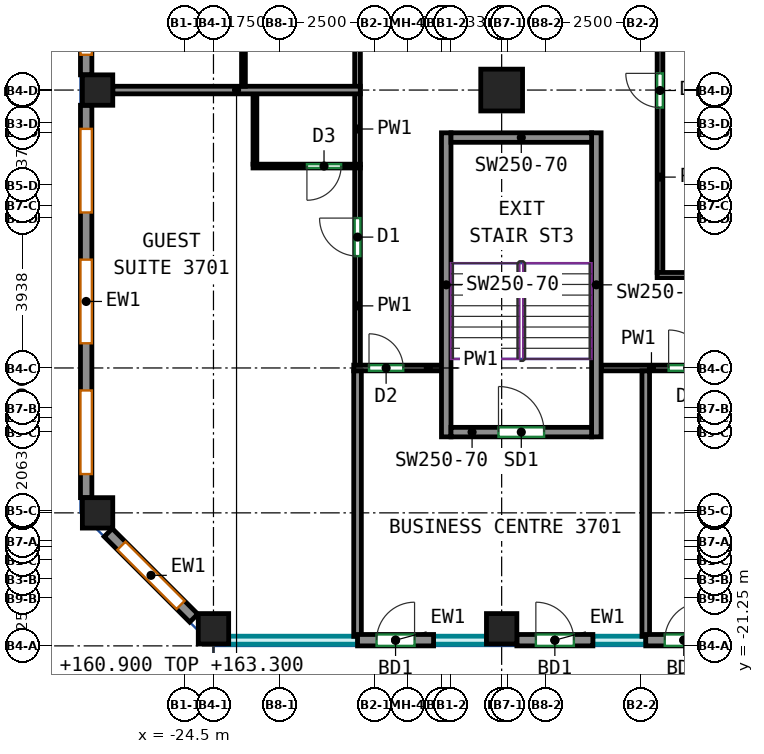
"""IFC4 building model, lengths in metres.
Left out: names, types, materials, properties, quantities, classifications, styles, units other than length and angle.
Written with IfcOpenShell. Run it as: python <this file> out.ifc"""

import sys

from ifc_helpers import new_model, si_unit, direction, frame, frame_2d, origin, origin_2d, place, context, subcontext, project, spatial, rectangle, extrude, source, transform, mapped, element, fill, save


model = new_model("IFC4")
c1 = context("Model", 3, precision=1e-05, world=origin(), true_north=direction((0.0, 1.0)))
c2 = subcontext(c1, "Body", "Model", "MODEL_VIEW")
j1 = project(units=[si_unit("LENGTHUNIT", "METRE"), si_unit("PLANEANGLEUNIT", "RADIAN")], contexts=[c1])
p1 = place(None, origin())
s1 = spatial("IfcSite", under=j1, at=p1, CompositionType="ELEMENT")
p2 = place(p1, origin())
s2 = spatial("IfcBuilding", under=s1, at=p2, CompositionType="ELEMENT")
p3 = place(p2, frame((0.0, 0.0, 160.9)))
s3 = spatial("IfcBuildingStorey", under=s2, at=p3, CompositionType="ELEMENT", Elevation=160.9)
m1 = source(origin(), c2, "Body", "SweptSolid", [
    extrude(rectangle(XDim=0.8, YDim=0.8, at=origin_2d()), origin(), (0.0, 0.0, 1.0), 3.0),
])
for number, where, z_axis, x_axis in (
    (1, (-26.8, -17.75, 0.0), (0.0, 0.0, 1.0), (1.0, 0.0, 0.0)),
    (2, (-26.8, -6.625, 0.0), (0.0, 0.0, 1.0), (1.0, 0.0, 0.0)),
    (3, (-23.75, -20.8, 0.0), (0.0, 0.0, 1.0), (1.0, 0.0, 0.0)),
    (4, (-16.167, -20.8, 0.0), (0.0, 0.0, 1.0), (1.0, 0.0, 0.0)),
):
    element("IfcColumn", number, at=place(p3, frame(where, z_axis=z_axis, x_axis=x_axis)), inside=s3, PredefinedType="COLUMN", context=c2, shape_type="MappedRepresentation", body=[
        mapped(m1, transform((0.0, 0.0, 0.0))),
    ])
m2 = source(origin(), c2, "Body", "SweptSolid", [
    extrude(rectangle(XDim=1.1, YDim=1.1, at=origin_2d()), origin(), (0.0, 0.0, 1.0), 3.0),
])
p4 = place(p3, frame((-16.167, -6.625, 0.0), z_axis=(0.0, 0.0, 1.0), x_axis=(1.0, 0.0, 0.0)))
e5 = element("IfcColumn", 5, at=p4, inside=s3, PredefinedType="COLUMN", context=c2, shape_type="MappedRepresentation", body=[
    mapped(m2, transform((0.0, 0.0, 0.0))),
])
m3 = source(origin(), c2, "Body", "SweptSolid", [
    extrude(rectangle(XDim=8.0, YDim=0.25, at=frame_2d((4.0, 0.0))), origin(), (0.0, 0.0, 1.0), 3.0),
])
for number, where, z_axis, x_axis in (
    (6, (-17.625, -15.75, 0.0), (0.0, 0.0, 1.0), (0.0, 1.0, 0.0)),
    (7, (-13.675, -15.75, 0.0), (0.0, 0.0, 1.0), (0.0, 1.0, 0.0)),
):
    element("IfcWall", number, at=place(p3, frame(where, z_axis=z_axis, x_axis=x_axis)), inside=s3, PredefinedType="SHEAR", context=c2, shape_type="MappedRepresentation", body=[
        mapped(m3, transform((0.0, 0.0, 0.0))),
    ])
m4 = source(origin(), c2, "Body", "SweptSolid", [
    extrude(rectangle(XDim=3.7, YDim=0.25, at=frame_2d((1.85, 0.0))), origin(), (0.0, 0.0, 1.0), 3.0),
])
p5 = place(p3, frame((-17.5, -15.625, 0.0), z_axis=(0.0, 0.0, 1.0), x_axis=(1.0, 0.0, 0.0)))
e8 = element("IfcWall", 8, at=p5, inside=s3, PredefinedType="SHEAR", context=c2, shape_type="MappedRepresentation", body=[
    mapped(m4, transform((0.0, 0.0, 0.0))),
])
p6 = place(p5, frame((1.25, 0.0, 0.0)))
e9 = element("IfcOpeningElement", 9, at=p6, cuts=e8, PredefinedType="OPENING", context=c2, shape_type="SweptSolid", body=[
    extrude(rectangle(XDim=1.2, YDim=2.1, at=frame_2d((0.6, 1.05))), frame((0.0, 0.135, 0.0), z_axis=(0.0, -1.0, 0.0), x_axis=(1.0, 0.0, 0.0)), (0.0, 0.0, 1.0), 0.27),
])
p7 = place(p3, frame((-17.5, -7.875, 0.0), z_axis=(0.0, 0.0, 1.0), x_axis=(1.0, 0.0, 0.0)))
e10 = element("IfcWall", 10, at=p7, inside=s3, PredefinedType="SHEAR", context=c2, shape_type="MappedRepresentation", body=[
    mapped(m4, transform((0.0, 0.0, 0.0))),
])
m5 = source(origin(), c2, "Body", "SweptSolid", [
    extrude(rectangle(XDim=2.0, YDim=0.3, at=frame_2d((1.0, 0.0))), origin(), (0.0, 0.0, 1.0), 3.0),
])
p8 = place(p3, frame((-19.958, -21.1, 0.0), z_axis=(0.0, 0.0, 1.0), x_axis=(1.0, 0.0, 0.0)))
e11 = element("IfcWall", 11, at=p8, inside=s3, PredefinedType="SOLIDWALL", context=c2, shape_type="MappedRepresentation", body=[
    mapped(m5, transform((0.0, 0.0, 0.0))),
])
p9 = place(p8, frame((0.5, 0.0, 0.0)))
e12 = element("IfcOpeningElement", 12, at=p9, cuts=e11, PredefinedType="OPENING", context=c2, shape_type="SweptSolid", body=[
    extrude(rectangle(XDim=1.0, YDim=2.1, at=frame_2d((0.5, 1.05))), frame((0.0, 0.16, 0.0), z_axis=(0.0, -1.0, 0.0), x_axis=(1.0, 0.0, 0.0)), (0.0, 0.0, 1.0), 0.32),
])
p10 = place(p3, frame((-15.767, -21.1, 0.0), z_axis=(0.0, 0.0, 1.0), x_axis=(1.0, 0.0, 0.0)))
e13 = element("IfcWall", 13, at=p10, inside=s3, PredefinedType="SOLIDWALL", context=c2, shape_type="MappedRepresentation", body=[
    mapped(m5, transform((0.0, 0.0, 0.0))),
])
p11 = place(p10, frame((0.5, 0.0, 0.0)))
e14 = element("IfcOpeningElement", 14, at=p11, cuts=e13, PredefinedType="OPENING", context=c2, shape_type="SweptSolid", body=[
    extrude(rectangle(XDim=1.0, YDim=2.1, at=frame_2d((0.5, 1.05))), frame((0.0, 0.16, 0.0), z_axis=(0.0, -1.0, 0.0), x_axis=(1.0, 0.0, 0.0)), (0.0, 0.0, 1.0), 0.32),
])
p12 = place(p3, frame((-12.375, -21.1, 0.0), z_axis=(0.0, 0.0, 1.0), x_axis=(1.0, 0.0, 0.0)))
e15 = element("IfcWall", 15, at=p12, inside=s3, PredefinedType="SOLIDWALL", context=c2, shape_type="MappedRepresentation", body=[
    mapped(m5, transform((0.0, 0.0, 0.0))),
])
p13 = place(p12, frame((0.5, 0.0, 0.0)))
e16 = element("IfcOpeningElement", 16, at=p13, cuts=e15, PredefinedType="OPENING", context=c2, shape_type="SweptSolid", body=[
    extrude(rectangle(XDim=1.0, YDim=2.1, at=frame_2d((0.5, 1.05))), frame((0.0, 0.16, 0.0), z_axis=(0.0, -1.0, 0.0), x_axis=(1.0, 0.0, 0.0)), (0.0, 0.0, 1.0), 0.32),
])
m6 = source(origin(), c2, "Body", "SweptSolid", [
    extrude(rectangle(XDim=6.513, YDim=0.3, at=frame_2d((3.256, 0.0))), origin(), (0.0, 0.0, 1.0), 3.0),
])
p14 = place(p3, frame((-27.1, 0.288, 0.0), z_axis=(0.0, 0.0, 1.0), x_axis=(0.0, -1.0, 0.0)))
e17 = element("IfcWall", 17, at=p14, inside=s3, PredefinedType="SOLIDWALL", context=c2, shape_type="MappedRepresentation", body=[
    mapped(m6, transform((0.0, 0.0, 0.0))),
])
p15 = place(p14, frame((0.528, 0.0, 0.85)))
e18 = element("IfcOpeningElement", 18, at=p15, cuts=e17, PredefinedType="OPENING", context=c2, shape_type="SweptSolid", body=[
    extrude(rectangle(XDim=2.2, YDim=1.95, at=frame_2d((1.1, 0.975))), frame((0.0, 0.16, 0.0), z_axis=(0.0, -1.0, 0.0), x_axis=(1.0, 0.0, 0.0)), (0.0, 0.0, 1.0), 0.32),
])
p16 = place(p14, frame((3.784, 0.0, 0.85)))
e19 = element("IfcOpeningElement", 19, at=p16, cuts=e17, PredefinedType="OPENING", context=c2, shape_type="SweptSolid", body=[
    extrude(rectangle(XDim=2.2, YDim=1.95, at=frame_2d((1.1, 0.975))), frame((0.0, 0.16, 0.0), z_axis=(0.0, -1.0, 0.0), x_axis=(1.0, 0.0, 0.0)), (0.0, 0.0, 1.0), 0.32),
])
m7 = source(origin(), c2, "Body", "SweptSolid", [
    extrude(rectangle(XDim=10.325, YDim=0.3, at=frame_2d((5.163, 0.0))), origin(), (0.0, 0.0, 1.0), 3.0),
])
p17 = place(p3, frame((-27.1, -7.025, 0.0), z_axis=(0.0, 0.0, 1.0), x_axis=(0.0, -1.0, 0.0)))
e20 = element("IfcWall", 20, at=p17, inside=s3, PredefinedType="SOLIDWALL", context=c2, shape_type="MappedRepresentation", body=[
    mapped(m7, transform((0.0, 0.0, 0.0))),
])
p18 = place(p17, frame((0.621, 0.0, 0.85)))
e21 = element("IfcOpeningElement", 21, at=p18, cuts=e20, PredefinedType="OPENING", context=c2, shape_type="SweptSolid", body=[
    extrude(rectangle(XDim=2.2, YDim=1.95, at=frame_2d((1.1, 0.975))), frame((0.0, 0.16, 0.0), z_axis=(0.0, -1.0, 0.0), x_axis=(1.0, 0.0, 0.0)), (0.0, 0.0, 1.0), 0.32),
])
p19 = place(p17, frame((4.062, 0.0, 0.85)))
e22 = element("IfcOpeningElement", 22, at=p19, cuts=e20, PredefinedType="OPENING", context=c2, shape_type="SweptSolid", body=[
    extrude(rectangle(XDim=2.2, YDim=1.95, at=frame_2d((1.1, 0.975))), frame((0.0, 0.16, 0.0), z_axis=(0.0, -1.0, 0.0), x_axis=(1.0, 0.0, 0.0)), (0.0, 0.0, 1.0), 0.32),
])
p20 = place(p17, frame((7.504, 0.0, 0.85)))
e23 = element("IfcOpeningElement", 23, at=p20, cuts=e20, PredefinedType="OPENING", context=c2, shape_type="SweptSolid", body=[
    extrude(rectangle(XDim=2.2, YDim=1.95, at=frame_2d((1.1, 0.975))), frame((0.0, 0.16, 0.0), z_axis=(0.0, -1.0, 0.0), x_axis=(1.0, 0.0, 0.0)), (0.0, 0.0, 1.0), 0.32),
])
m8 = source(origin(), c2, "Body", "SweptSolid", [
    extrude(rectangle(XDim=3.182, YDim=0.3, at=frame_2d((1.591, 0.0))), origin(), (0.0, 0.0, 1.0), 3.0),
])
p21 = place(p3, frame((-26.519, -18.269, 0.0), z_axis=(0.0, 0.0, 1.0), x_axis=(0.707068419229, -0.707145141063, 0.0)))
e24 = element("IfcWall", 24, at=p21, inside=s3, PredefinedType="SOLIDWALL", context=c2, shape_type="MappedRepresentation", body=[
    mapped(m8, transform((0.0, 0.0, 0.0))),
])
p22 = place(p21, frame((0.491, 0.0, 0.85)))
e25 = element("IfcOpeningElement", 25, at=p22, cuts=e24, PredefinedType="OPENING", context=c2, shape_type="SweptSolid", body=[
    extrude(rectangle(XDim=2.2, YDim=1.95, at=frame_2d((1.1, 0.975))), frame((0.0, 0.16, 0.0), z_axis=(0.0, -1.0, 0.0), x_axis=(1.0, 0.0, 0.0)), (0.0, 0.0, 1.0), 0.32),
])
p23 = place(p3, frame((-13.55, -13.938, 0.0), z_axis=(0.0, 0.0, 1.0), x_axis=(1.0, 0.0, 0.0)))
e26 = element("IfcWall", 26, at=p23, inside=s3, PredefinedType="PARTITIONING", context=c2, shape_type="SweptSolid", body=[
    extrude(rectangle(XDim=4.417, YDim=0.15, at=frame_2d((2.208, 0.0))), origin(), (0.0, 0.0, 1.0), 3.0),
])
p24 = place(p23, frame((1.777, 0.0, 0.0)))
e27 = element("IfcOpeningElement", 27, at=p24, cuts=e26, PredefinedType="OPENING", context=c2, shape_type="SweptSolid", body=[
    extrude(rectangle(XDim=1.0, YDim=2.1, at=frame_2d((0.5, 1.05))), frame((0.0, 0.085, 0.0), z_axis=(0.0, -1.0, 0.0), x_axis=(1.0, 0.0, 0.0)), (0.0, 0.0, 1.0), 0.17),
])
p25 = place(p3, frame((-20.059, -13.938, 0.0), z_axis=(0.0, 0.0, 1.0), x_axis=(1.0, 0.0, 0.0)))
e28 = element("IfcWall", 28, at=p25, inside=s3, PredefinedType="PARTITIONING", context=c2, shape_type="SweptSolid", body=[
    extrude(rectangle(XDim=2.309, YDim=0.15, at=frame_2d((1.155, 0.0))), origin(), (0.0, 0.0, 1.0), 3.0),
])
p26 = place(p25, frame((0.402, 0.0, 0.0)))
e29 = element("IfcOpeningElement", 29, at=p26, cuts=e28, PredefinedType="OPENING", context=c2, shape_type="SweptSolid", body=[
    extrude(rectangle(XDim=0.9, YDim=2.1, at=frame_2d((0.45, 1.05))), frame((0.0, 0.085, 0.0), z_axis=(0.0, -1.0, 0.0), x_axis=(1.0, 0.0, 0.0)), (0.0, 0.0, 1.0), 0.17),
])
p27 = place(p3, frame((-19.959, -13.863, 0.0), z_axis=(0.0, 0.0, 1.0), x_axis=(0.0, 1.0, 0.0)))
e30 = element("IfcWall", 30, at=p27, inside=s3, PredefinedType="PARTITIONING", context=c2, shape_type="SweptSolid", body=[
    extrude(rectangle(XDim=5.198, YDim=0.15, at=frame_2d((2.599, 0.0))), origin(), (0.0, 0.0, 1.0), 3.0),
])
p28 = place(p27, frame((2.869, 0.0, 0.0)))
e31 = element("IfcOpeningElement", 31, at=p28, cuts=e30, PredefinedType="OPENING", context=c2, shape_type="SweptSolid", body=[
    extrude(rectangle(XDim=1.0, YDim=2.1, at=frame_2d((0.5, 1.05))), frame((0.0, 0.085, 0.0), z_axis=(0.0, -1.0, 0.0), x_axis=(1.0, 0.0, 0.0)), (0.0, 0.0, 1.0), 0.17),
])
p29 = place(p3, frame((-19.959, -8.585, 0.0), z_axis=(0.0, 0.0, 1.0), x_axis=(0.0, 1.0, 0.0)))
e32 = element("IfcWall", 32, at=p29, inside=s3, PredefinedType="PARTITIONING", context=c2, shape_type="SweptSolid", body=[
    extrude(rectangle(XDim=1.87, YDim=0.15, at=frame_2d((0.935, 0.0))), origin(), (0.0, 0.0, 1.0), 3.0),
])
p30 = place(p3, frame((-19.959, -6.535, 0.0), z_axis=(0.0, 0.0, 1.0), x_axis=(0.0, 1.0, 0.0)))
e33 = element("IfcWall", 33, at=p30, inside=s3, PredefinedType="PARTITIONING", context=c2, shape_type="SweptSolid", body=[
    extrude(rectangle(XDim=2.07, YDim=0.15, at=frame_2d((1.035, 0.0))), origin(), (0.0, 0.0, 1.0), 3.0),
])
p31 = place(p3, frame((-12.0, -11.425, 0.0), z_axis=(0.0, 0.0, 1.0), x_axis=(0.0, 1.0, 0.0)))
e34 = element("IfcWall", 34, at=p31, inside=s3, PredefinedType="PARTITIONING", context=c2, shape_type="SweptSolid", body=[
    extrude(rectangle(XDim=8.366, YDim=0.15, at=frame_2d((4.183, 0.0))), origin(), (0.0, 0.0, 1.0), 3.0),
])
p32 = place(p31, frame((4.339, 0.0, 0.0)))
e35 = element("IfcOpeningElement", 35, at=p32, cuts=e34, PredefinedType="OPENING", context=c2, shape_type="SweptSolid", body=[
    extrude(rectangle(XDim=0.9, YDim=2.1, at=frame_2d((0.45, 1.05))), frame((0.0, 0.085, 0.0), z_axis=(0.0, -1.0, 0.0), x_axis=(1.0, 0.0, 0.0)), (0.0, 0.0, 1.0), 0.17),
])
p33 = place(p3, frame((-12.075, -11.5, 0.0), z_axis=(0.0, 0.0, 1.0), x_axis=(1.0, 0.0, 0.0)))
e36 = element("IfcWall", 36, at=p33, inside=s3, PredefinedType="PARTITIONING", context=c2, shape_type="SweptSolid", body=[
    extrude(rectangle(XDim=28.35, YDim=0.15, at=frame_2d((14.175, 0.0))), origin(), (0.0, 0.0, 1.0), 3.0),
])
p34 = place(p33, frame((11.373, 0.0, 0.0)))
e37 = element("IfcOpeningElement", 37, at=p34, cuts=e36, PredefinedType="OPENING", context=c2, shape_type="SweptSolid", body=[
    extrude(rectangle(XDim=0.9, YDim=2.1, at=frame_2d((0.45, 1.05))), frame((0.0, 0.085, 0.0), z_axis=(0.0, -1.0, 0.0), x_axis=(1.0, 0.0, 0.0)), (0.0, 0.0, 1.0), 0.17),
])
for number, where, z_axis, x_axis in (
    (38, (-12.375, -21.0, 0.0), (0.0, 0.0, 1.0), (0.0, 1.0, 0.0)),
    (39, (-19.959, -21.0, 0.0), (0.0, 0.0, 1.0), (0.0, 1.0, 0.0)),
):
    element("IfcWall", number, at=place(p3, frame(where, z_axis=z_axis, x_axis=x_axis)), inside=s3, PredefinedType="PARTITIONING", context=c2, shape_type="SweptSolid", body=[
        extrude(rectangle(XDim=6.985, YDim=0.2, at=frame_2d((3.493, 0.0))), origin(), (0.0, 0.0, 1.0), 3.0),
    ])
p35 = place(p3, frame((-22.659, -8.575, 0.0), z_axis=(0.0, 0.0, 1.0), x_axis=(0.0, 1.0, 0.0)))
e40 = element("IfcWall", 40, at=p35, inside=s3, PredefinedType="PARTITIONING", context=c2, shape_type="SweptSolid", body=[
    extrude(rectangle(XDim=1.85, YDim=0.1, at=frame_2d((0.925, 0.0))), origin(), (0.0, 0.0, 1.0), 3.0),
])
p36 = place(p3, frame((-19.886, -8.625, 0.0), z_axis=(0.0, 0.0, 1.0), x_axis=(-1.0, 0.0, 0.0)))
e41 = element("IfcWall", 41, at=p36, inside=s3, PredefinedType="PARTITIONING", context=c2, shape_type="SweptSolid", body=[
    extrude(rectangle(XDim=2.823, YDim=0.1, at=frame_2d((1.412, 0.0))), origin(), (0.0, 0.0, 1.0), 3.0),
])
p37 = place(p36, frame((0.505, 0.0, 0.0)))
e42 = element("IfcOpeningElement", 42, at=p37, cuts=e41, PredefinedType="OPENING", context=c2, shape_type="SweptSolid", body=[
    extrude(rectangle(XDim=0.9, YDim=2.1, at=frame_2d((0.45, 1.05))), frame((0.0, 0.06, 0.0), z_axis=(0.0, -1.0, 0.0), x_axis=(1.0, 0.0, 0.0)), (0.0, 0.0, 1.0), 0.12),
])
p38 = place(p3, frame((-26.4, -6.625, 0.0), z_axis=(0.0, 0.0, 1.0), x_axis=(1.0, 0.0, 0.0)))
e43 = element("IfcWall", 43, at=p38, inside=s3, PredefinedType="PARTITIONING", context=c2, shape_type="SweptSolid", body=[
    extrude(rectangle(XDim=6.514, YDim=0.2, at=frame_2d((3.257, 0.0))), origin(), (0.0, 0.0, 1.0), 2.4),
])
p39 = place(p3, frame((-22.961, -6.525, 0.0), z_axis=(0.0, 0.0, 1.0), x_axis=(0.0, 1.0, 0.0)))
e44 = element("IfcWall", 44, at=p39, inside=s3, PredefinedType="PARTITIONING", context=c2, shape_type="SweptSolid", body=[
    extrude(rectangle(XDim=2.05, YDim=0.1, at=frame_2d((1.025, 0.0))), origin(), (0.0, 0.0, 1.0), 3.0),
])
p40 = place(p9, origin())
e45 = element("IfcDoor", 45, at=p40, inside=s3, OperationType="SINGLE_SWING_RIGHT", PredefinedType="DOOR", context=c2, shape_type="SweptSolid", body=[
    extrude(rectangle(XDim=1.0, YDim=2.1, at=frame_2d((0.5, 1.05))), frame((0.0, 0.025, 0.0), z_axis=(0.0, -1.0, 0.0), x_axis=(1.0, 0.0, 0.0)), (0.0, 0.0, 1.0), 0.05),
])
fill(e12, e45)
p41 = place(p11, origin())
e46 = element("IfcDoor", 46, at=p41, inside=s3, OperationType="SINGLE_SWING_LEFT", PredefinedType="DOOR", context=c2, shape_type="SweptSolid", body=[
    extrude(rectangle(XDim=1.0, YDim=2.1, at=frame_2d((0.5, 1.05))), frame((0.0, 0.025, 0.0), z_axis=(0.0, -1.0, 0.0), x_axis=(1.0, 0.0, 0.0)), (0.0, 0.0, 1.0), 0.05),
])
fill(e14, e46)
p42 = place(p13, origin())
e47 = element("IfcDoor", 47, at=p42, inside=s3, OperationType="SINGLE_SWING_RIGHT", PredefinedType="DOOR", context=c2, shape_type="SweptSolid", body=[
    extrude(rectangle(XDim=1.0, YDim=2.1, at=frame_2d((0.5, 1.05))), frame((0.0, 0.025, 0.0), z_axis=(0.0, -1.0, 0.0), x_axis=(1.0, 0.0, 0.0)), (0.0, 0.0, 1.0), 0.05),
])
fill(e16, e47)
p43 = place(p16, origin())
e48 = element("IfcWindow", 48, at=p43, inside=s3, PartitioningType="SINGLE_PANEL", PredefinedType="WINDOW", context=c2, shape_type="SweptSolid", body=[
    extrude(rectangle(XDim=2.2, YDim=1.95, at=frame_2d((1.1, 0.975))), frame((0.0, 0.03, 0.0), z_axis=(0.0, -1.0, 0.0), x_axis=(1.0, 0.0, 0.0)), (0.0, 0.0, 1.0), 0.06),
])
fill(e19, e48)
p44 = place(p18, origin())
e49 = element("IfcWindow", 49, at=p44, inside=s3, PartitioningType="SINGLE_PANEL", PredefinedType="WINDOW", context=c2, shape_type="SweptSolid", body=[
    extrude(rectangle(XDim=2.2, YDim=1.95, at=frame_2d((1.1, 0.975))), frame((0.0, 0.03, 0.0), z_axis=(0.0, -1.0, 0.0), x_axis=(1.0, 0.0, 0.0)), (0.0, 0.0, 1.0), 0.06),
])
fill(e21, e49)
p45 = place(p19, origin())
e50 = element("IfcWindow", 50, at=p45, inside=s3, PartitioningType="SINGLE_PANEL", PredefinedType="WINDOW", context=c2, shape_type="SweptSolid", body=[
    extrude(rectangle(XDim=2.2, YDim=1.95, at=frame_2d((1.1, 0.975))), frame((0.0, 0.03, 0.0), z_axis=(0.0, -1.0, 0.0), x_axis=(1.0, 0.0, 0.0)), (0.0, 0.0, 1.0), 0.06),
])
fill(e22, e50)
p46 = place(p20, origin())
e51 = element("IfcWindow", 51, at=p46, inside=s3, PartitioningType="SINGLE_PANEL", PredefinedType="WINDOW", context=c2, shape_type="SweptSolid", body=[
    extrude(rectangle(XDim=2.2, YDim=1.95, at=frame_2d((1.1, 0.975))), frame((0.0, 0.03, 0.0), z_axis=(0.0, -1.0, 0.0), x_axis=(1.0, 0.0, 0.0)), (0.0, 0.0, 1.0), 0.06),
])
fill(e23, e51)
p47 = place(p22, origin())
e52 = element("IfcWindow", 52, at=p47, inside=s3, PartitioningType="SINGLE_PANEL", PredefinedType="WINDOW", context=c2, shape_type="SweptSolid", body=[
    extrude(rectangle(XDim=2.2, YDim=1.95, at=frame_2d((1.1, 0.975))), frame((0.0, 0.03, 0.0), z_axis=(0.0, -1.0, 0.0), x_axis=(1.0, 0.0, 0.0)), (0.0, 0.0, 1.0), 0.06),
])
fill(e25, e52)
p48 = place(p6, origin())
e53 = element("IfcDoor", 53, at=p48, inside=s3, OperationType="DOUBLE_DOOR_SINGLE_SWING", PredefinedType="DOOR", context=c2, shape_type="SweptSolid", body=[
    extrude(rectangle(XDim=1.2, YDim=2.1, at=frame_2d((0.6, 1.05))), frame((0.0, 0.025, 0.0), z_axis=(0.0, -1.0, 0.0), x_axis=(1.0, 0.0, 0.0)), (0.0, 0.0, 1.0), 0.05),
])
fill(e9, e53)
p49 = place(p26, origin())
e54 = element("IfcDoor", 54, at=p49, inside=s3, OperationType="SINGLE_SWING_LEFT", PredefinedType="DOOR", context=c2, shape_type="SweptSolid", body=[
    extrude(rectangle(XDim=0.9, YDim=2.1, at=frame_2d((0.45, 1.05))), frame((0.0, 0.025, 0.0), z_axis=(0.0, -1.0, 0.0), x_axis=(1.0, 0.0, 0.0)), (0.0, 0.0, 1.0), 0.05),
])
fill(e29, e54)
p50 = place(p24, origin())
e55 = element("IfcDoor", 55, at=p50, inside=s3, OperationType="SINGLE_SWING_LEFT", PredefinedType="DOOR", context=c2, shape_type="SweptSolid", body=[
    extrude(rectangle(XDim=1.0, YDim=2.1, at=frame_2d((0.5, 1.05))), frame((0.0, 0.025, 0.0), z_axis=(0.0, -1.0, 0.0), x_axis=(1.0, 0.0, 0.0)), (0.0, 0.0, 1.0), 0.05),
])
fill(e27, e55)
p51 = place(p28, origin())
e56 = element("IfcDoor", 56, at=p51, inside=s3, OperationType="SINGLE_SWING_RIGHT", PredefinedType="DOOR", context=c2, shape_type="SweptSolid", body=[
    extrude(rectangle(XDim=1.0, YDim=2.1, at=frame_2d((0.5, 1.05))), frame((0.0, 0.025, 0.0), z_axis=(0.0, -1.0, 0.0), x_axis=(1.0, 0.0, 0.0)), (0.0, 0.0, 1.0), 0.05),
])
fill(e31, e56)
p52 = place(p37, origin())
e57 = element("IfcDoor", 57, at=p52, inside=s3, OperationType="SINGLE_SWING_RIGHT", PredefinedType="DOOR", context=c2, shape_type="SweptSolid", body=[
    extrude(rectangle(XDim=0.9, YDim=2.1, at=frame_2d((0.45, 1.05))), frame((0.0, 0.025, 0.0), z_axis=(0.0, -1.0, 0.0), x_axis=(1.0, 0.0, 0.0)), (0.0, 0.0, 1.0), 0.05),
])
fill(e42, e57)
p53 = place(p32, origin())
e58 = element("IfcDoor", 58, at=p53, inside=s3, OperationType="SINGLE_SWING_RIGHT", PredefinedType="DOOR", context=c2, shape_type="SweptSolid", body=[
    extrude(rectangle(XDim=0.9, YDim=2.1, at=frame_2d((0.45, 1.05))), frame((0.0, 0.025, 0.0), z_axis=(0.0, -1.0, 0.0), x_axis=(1.0, 0.0, 0.0)), (0.0, 0.0, 1.0), 0.05),
])
fill(e35, e58)
save(model, sys.argv[1])
